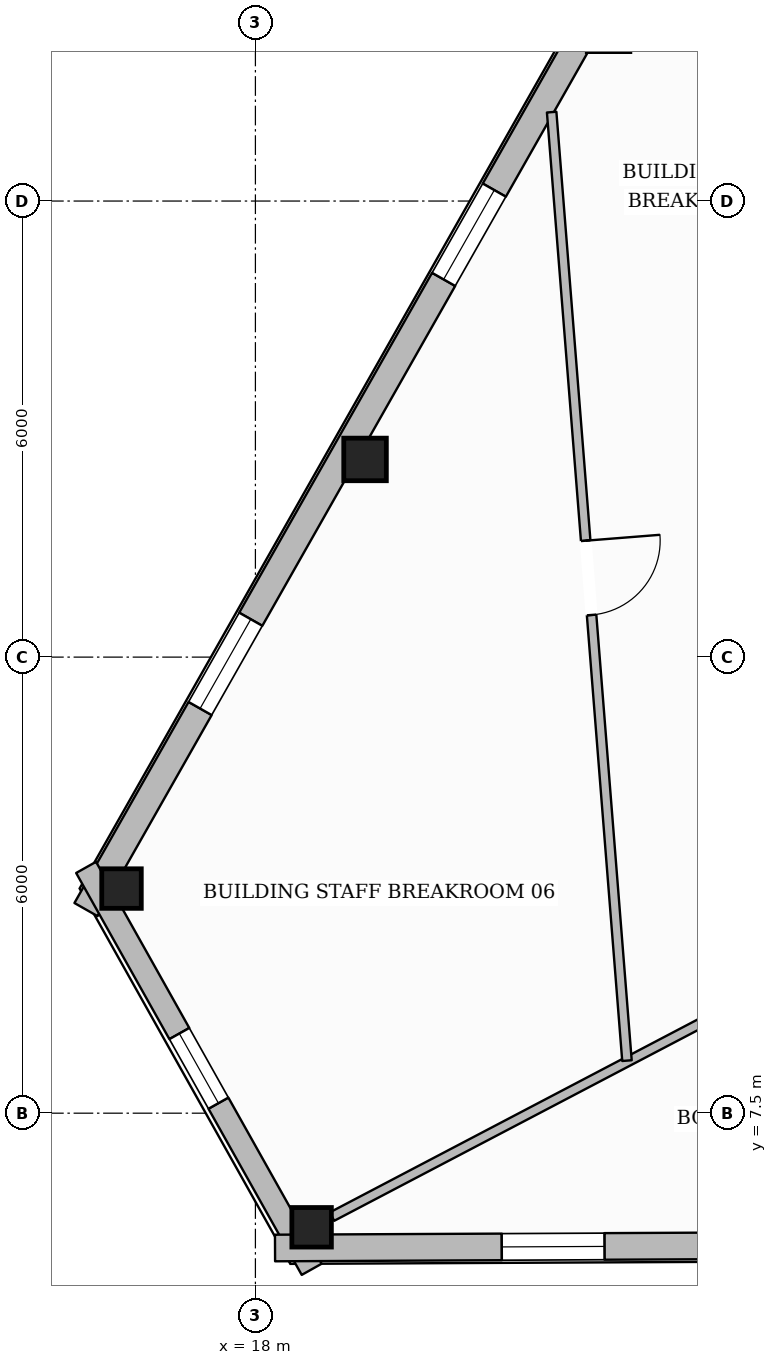
"""IFC4 building model, lengths in metres.
Left out: names, types, materials, properties, quantities, classifications, styles, units other than length and angle.
Written with IfcOpenShell. Run it as: python <this file> out.ifc"""

import sys

from ifc_helpers import new_model, si_unit, direction, frame, frame_2d, origin, origin_2d, place, context, subcontext, project, spatial, rectangle, hollow_rectangle, extrude, element, fill, save


model = new_model("IFC4")
c1 = context("Model", 3, precision=1e-05, world=origin(), true_north=direction((0.0, 1.0)))
c2 = subcontext(c1, "Body", "Model", "MODEL_VIEW")
j1 = project(units=[si_unit("LENGTHUNIT", "METRE"), si_unit("PLANEANGLEUNIT", "RADIAN")], contexts=[c1])
p1 = place(None, origin())
s1 = spatial("IfcSite", under=j1, at=p1, CompositionType="ELEMENT")
p2 = place(p1, origin())
s2 = spatial("IfcBuilding", under=s1, at=p2, CompositionType="ELEMENT")
p3 = place(p2, frame((0.0, 0.0, 301.1)))
s3 = spatial("IfcBuildingStorey", under=s2, at=p3, CompositionType="ELEMENT", Elevation=301.1)
p4 = place(p3, frame((19.442, 16.101, 0.0), z_axis=(0.0, 0.0, 1.0), x_axis=(1.0, 0.0, 0.0)))
e1 = element("IfcColumn", 1, at=p4, inside=s3, PredefinedType="COLUMN", context=c2, shape_type="SweptSolid", body=[
    extrude(hollow_rectangle(XDim=0.56, YDim=0.56, WallThickness=0.025, at=origin_2d()), origin(), (0.0, 0.0, 1.0), 3.635),
])
for number, where, z_axis, x_axis in (
    (2, (16.239, 10.455, 0.0), (0.0, 0.0, 1.0), (1.0, 0.0, 0.0)),
    (3, (18.74, 5.999, 0.0), (0.0, 0.0, 1.0), (1.0, 0.0, 0.0)),
):
    element("IfcColumn", number, at=place(p3, frame(where, z_axis=z_axis, x_axis=x_axis)), inside=s3, PredefinedType="COLUMN", context=c2, shape_type="SweptSolid", body=[
        extrude(hollow_rectangle(XDim=0.52, YDim=0.52, WallThickness=0.024, at=origin_2d()), origin(), (0.0, 0.0, 1.0), 3.635),
    ])
p5 = place(p3, frame((15.771, 10.179, 0.0), z_axis=(0.0, 0.0, 1.0), x_axis=(0.493569993775, 0.869706077503, 0.0)))
e4 = element("IfcWall", 4, at=p5, inside=s3, PredefinedType="STANDARD", context=c2, shape_type="SweptSolid", body=[
    extrude(rectangle(XDim=39.897, YDim=0.35, at=frame_2d((19.949, 0.0))), origin(), (0.0, 0.0, 1.0), 3.221),
])
p6 = place(p5, frame((35.499, 0.0, 0.65)))
e5 = element("IfcOpeningElement", 5, at=p6, cuts=e4, PredefinedType="OPENING", context=c2, shape_type="SweptSolid", body=[
    extrude(rectangle(XDim=1.35, YDim=1.75, at=frame_2d((0.675, 0.875))), frame((0.0, 0.185, 0.0), z_axis=(0.0, -1.0, 0.0), x_axis=(1.0, 0.0, 0.0)), (0.0, 0.0, 1.0), 0.37),
])
p7 = place(p5, frame((29.007, 0.0, 0.65)))
e6 = element("IfcOpeningElement", 6, at=p7, cuts=e4, PredefinedType="OPENING", context=c2, shape_type="SweptSolid", body=[
    extrude(rectangle(XDim=1.35, YDim=1.75, at=frame_2d((0.675, 0.875))), frame((0.0, 0.185, 0.0), z_axis=(0.0, -1.0, 0.0), x_axis=(1.0, 0.0, 0.0)), (0.0, 0.0, 1.0), 0.37),
])
p8 = place(p5, frame((22.516, 0.0, 0.65)))
e7 = element("IfcOpeningElement", 7, at=p8, cuts=e4, PredefinedType="OPENING", context=c2, shape_type="SweptSolid", body=[
    extrude(rectangle(XDim=1.35, YDim=1.75, at=frame_2d((0.675, 0.875))), frame((0.0, 0.185, 0.0), z_axis=(0.0, -1.0, 0.0), x_axis=(1.0, 0.0, 0.0)), (0.0, 0.0, 1.0), 0.37),
])
p9 = place(p5, frame((9.533, 0.0, 0.65)))
e8 = element("IfcOpeningElement", 8, at=p9, cuts=e4, PredefinedType="OPENING", context=c2, shape_type="SweptSolid", body=[
    extrude(rectangle(XDim=1.35, YDim=1.75, at=frame_2d((0.675, 0.875))), frame((0.0, 0.185, 0.0), z_axis=(0.0, -1.0, 0.0), x_axis=(1.0, 0.0, 0.0)), (0.0, 0.0, 1.0), 0.37),
])
p10 = place(p5, frame((3.042, 0.0, 0.65)))
e9 = element("IfcOpeningElement", 9, at=p10, cuts=e4, PredefinedType="OPENING", context=c2, shape_type="SweptSolid", body=[
    extrude(rectangle(XDim=1.35, YDim=1.75, at=frame_2d((0.675, 0.875))), frame((0.0, 0.185, 0.0), z_axis=(0.0, -1.0, 0.0), x_axis=(1.0, 0.0, 0.0)), (0.0, 0.0, 1.0), 0.37),
])
p11 = place(p3, frame((18.74, 5.446, 0.0), z_axis=(0.0, 0.0, 1.0), x_axis=(-0.489446669506, 0.872033231998, 0.0)))
e10 = element("IfcWall", 10, at=p11, inside=s3, PredefinedType="STANDARD", context=c2, shape_type="SweptSolid", body=[
    extrude(rectangle(XDim=6.063, YDim=0.3, at=frame_2d((3.032, 0.0))), origin(), (0.0, 0.0, 1.0), 3.221),
])
p12 = place(p11, frame((2.507, 0.0, 0.65)))
e11 = element("IfcOpeningElement", 11, at=p12, cuts=e10, PredefinedType="OPENING", context=c2, shape_type="SweptSolid", body=[
    extrude(rectangle(XDim=1.05, YDim=1.7, at=frame_2d((0.525, 0.85))), frame((0.0, 0.16, 0.0), z_axis=(0.0, -1.0, 0.0), x_axis=(1.0, 0.0, 0.0)), (0.0, 0.0, 1.0), 0.32),
])
p13 = place(p3, frame((57.329, 5.912, 0.0), z_axis=(0.0, 0.0, 1.0), x_axis=(-0.999988664308, -0.004761434209, 0.0)))
e12 = element("IfcWall", 12, at=p13, inside=s3, PredefinedType="STANDARD", context=c2, shape_type="SweptSolid", body=[
    extrude(rectangle(XDim=39.071, YDim=0.35, at=frame_2d((19.536, 0.0))), origin(), (0.0, 0.0, 1.0), 3.221),
])
p14 = place(p13, frame((28.703, 0.0, 0.0)))
e13 = element("IfcOpeningElement", 13, at=p14, cuts=e12, PredefinedType="OPENING", context=c2, shape_type="SweptSolid", body=[
    extrude(rectangle(XDim=1.0, YDim=2.2, at=frame_2d((0.5, 1.1))), frame((0.0, 0.185, 0.0), z_axis=(0.0, -1.0, 0.0), x_axis=(1.0, 0.0, 0.0)), (0.0, 0.0, 1.0), 0.37),
])
p15 = place(p13, frame((34.738, 0.0, 0.65)))
e14 = element("IfcOpeningElement", 14, at=p15, cuts=e12, PredefinedType="OPENING", context=c2, shape_type="SweptSolid", body=[
    extrude(rectangle(XDim=1.35, YDim=1.75, at=frame_2d((0.675, 0.875))), frame((0.0, 0.185, 0.0), z_axis=(0.0, -1.0, 0.0), x_axis=(1.0, 0.0, 0.0)), (0.0, 0.0, 1.0), 0.37),
])
p16 = place(p13, frame((22.034, 0.0, 0.65)))
e15 = element("IfcOpeningElement", 15, at=p16, cuts=e12, PredefinedType="OPENING", context=c2, shape_type="SweptSolid", body=[
    extrude(rectangle(XDim=1.35, YDim=1.75, at=frame_2d((0.675, 0.875))), frame((0.0, 0.185, 0.0), z_axis=(0.0, -1.0, 0.0), x_axis=(1.0, 0.0, 0.0)), (0.0, 0.0, 1.0), 0.37),
])
p17 = place(p13, frame((9.331, 0.0, 0.65)))
e16 = element("IfcOpeningElement", 16, at=p17, cuts=e12, PredefinedType="OPENING", context=c2, shape_type="SweptSolid", body=[
    extrude(rectangle(XDim=1.35, YDim=1.75, at=frame_2d((0.675, 0.875))), frame((0.0, 0.185, 0.0), z_axis=(0.0, -1.0, 0.0), x_axis=(1.0, 0.0, 0.0)), (0.0, 0.0, 1.0), 0.37),
])
p18 = place(p13, frame((2.979, 0.0, 0.65)))
e17 = element("IfcOpeningElement", 17, at=p18, cuts=e12, PredefinedType="OPENING", context=c2, shape_type="SweptSolid", body=[
    extrude(rectangle(XDim=1.35, YDim=1.75, at=frame_2d((0.675, 0.875))), frame((0.0, 0.185, 0.0), z_axis=(0.0, -1.0, 0.0), x_axis=(1.0, 0.0, 0.0)), (0.0, 0.0, 1.0), 0.37),
])
p19 = place(p3, frame((26.01, 9.812, 0.0), z_axis=(0.0, 0.0, 1.0), x_axis=(-0.885601154602, -0.464446546944, 0.0)))
e18 = element("IfcWall", 18, at=p19, inside=s3, PredefinedType="PARTITIONING", context=c2, shape_type="SweptSolid", body=[
    extrude(rectangle(XDim=7.906, YDim=0.125, at=frame_2d((3.953, 0.0))), origin(), (0.0, 0.0, 1.0), 3.271),
])
p20 = place(p3, frame((21.897, 20.67, 0.0), z_axis=(0.0, 0.0, 1.0), x_axis=(0.07914521928, -0.996863097053, 0.0)))
e19 = element("IfcWall", 19, at=p20, inside=s3, PredefinedType="PARTITIONING", context=c2, shape_type="SweptSolid", body=[
    extrude(rectangle(XDim=12.518, YDim=0.125, at=frame_2d((6.259, 0.0))), origin(), (0.0, 0.0, 1.0), 3.374),
])
p21 = place(p20, frame((5.656, 0.0, 0.0)))
e20 = element("IfcOpeningElement", 20, at=p21, cuts=e19, PredefinedType="OPENING", context=c2, shape_type="SweptSolid", body=[
    extrude(rectangle(XDim=0.98, YDim=2.15, at=frame_2d((0.49, 1.075))), frame((0.0, 0.073, 0.0), z_axis=(0.0, -1.0, 0.0), x_axis=(1.0, 0.0, 0.0)), (0.0, 0.0, 1.0), 0.145),
])
p22 = place(p9, origin())
e21 = element("IfcWindow", 21, at=p22, inside=s3, PartitioningType="SINGLE_PANEL", PredefinedType="WINDOW", context=c2, shape_type="SweptSolid", body=[
    extrude(rectangle(XDim=1.35, YDim=1.75, at=frame_2d((0.675, 0.875))), frame((0.0, 0.03, 0.0), z_axis=(0.0, -1.0, 0.0), x_axis=(1.0, 0.0, 0.0)), (0.0, 0.0, 1.0), 0.06),
])
fill(e8, e21)
p23 = place(p10, origin())
e22 = element("IfcWindow", 22, at=p23, inside=s3, PartitioningType="SINGLE_PANEL", PredefinedType="WINDOW", context=c2, shape_type="SweptSolid", body=[
    extrude(rectangle(XDim=1.35, YDim=1.75, at=frame_2d((0.675, 0.875))), frame((0.0, 0.03, 0.0), z_axis=(0.0, -1.0, 0.0), x_axis=(1.0, 0.0, 0.0)), (0.0, 0.0, 1.0), 0.06),
])
fill(e9, e22)
p24 = place(p15, origin())
e23 = element("IfcWindow", 23, at=p24, inside=s3, PartitioningType="SINGLE_PANEL", PredefinedType="WINDOW", context=c2, shape_type="SweptSolid", body=[
    extrude(rectangle(XDim=1.35, YDim=1.75, at=frame_2d((0.675, 0.875))), frame((0.0, 0.03, 0.0), z_axis=(0.0, -1.0, 0.0), x_axis=(1.0, 0.0, 0.0)), (0.0, 0.0, 1.0), 0.06),
])
fill(e14, e23)
p25 = place(p12, origin())
e24 = element("IfcWindow", 24, at=p25, inside=s3, PartitioningType="SINGLE_PANEL", PredefinedType="WINDOW", context=c2, shape_type="SweptSolid", body=[
    extrude(rectangle(XDim=1.05, YDim=1.7, at=frame_2d((0.525, 0.85))), frame((0.0, 0.03, 0.0), z_axis=(0.0, -1.0, 0.0), x_axis=(1.0, 0.0, 0.0)), (0.0, 0.0, 1.0), 0.06),
])
fill(e11, e24)
p26 = place(p21, origin())
e25 = element("IfcDoor", 25, at=p26, inside=s3, OperationType="SINGLE_SWING_LEFT", PredefinedType="DOOR", context=c2, shape_type="SweptSolid", body=[
    extrude(rectangle(XDim=0.98, YDim=2.15, at=frame_2d((0.49, 1.075))), frame((0.0, 0.025, 0.0), z_axis=(0.0, -1.0, 0.0), x_axis=(1.0, 0.0, 0.0)), (0.0, 0.0, 1.0), 0.05),
])
fill(e20, e25)
save(model, sys.argv[1])
